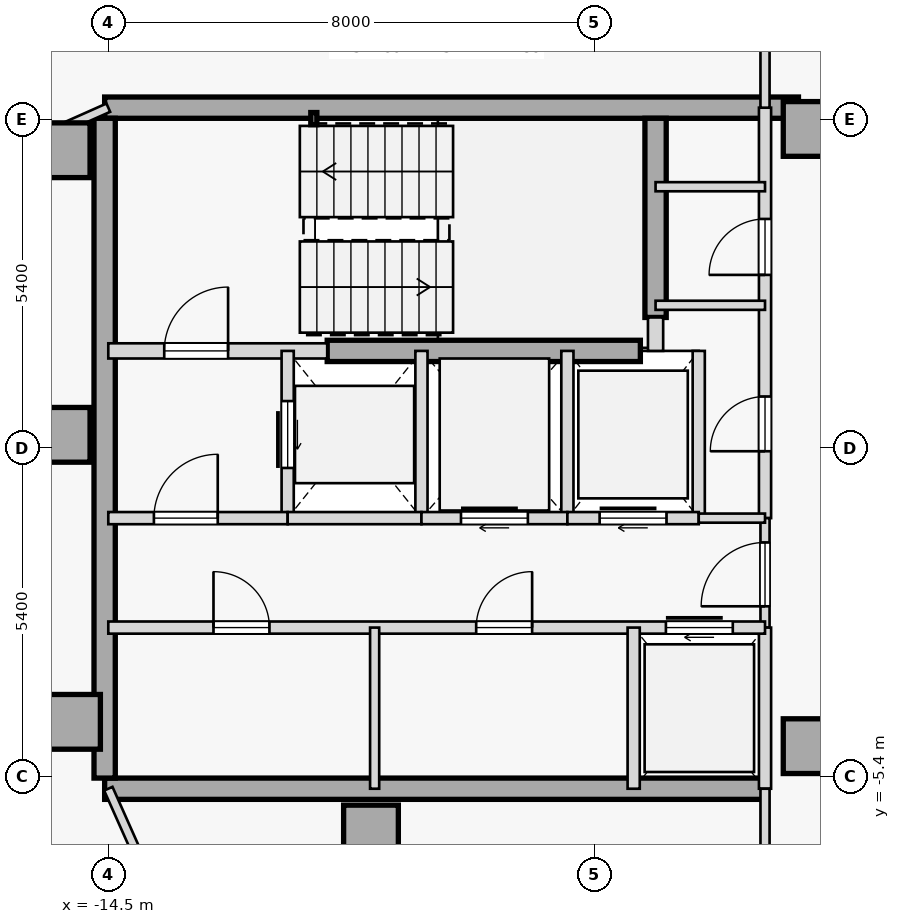
"""IFC4 building model, lengths in metres.
Left out: names, types, materials, properties, quantities, classifications, styles, units other than length and angle.
Written with IfcOpenShell. Run it as: python <this file> out.ifc"""

import sys

from ifc_helpers import new_model, si_unit, direction, frame, frame_2d, origin, origin_2d, place, context, subcontext, project, spatial, rectangle, hollow_rectangle, extrude, element, fill, save


model = new_model("IFC4")
c1 = context("Model", 3, precision=1e-05, world=origin(), true_north=direction((0.0, 1.0)))
c2 = subcontext(c1, "Body", "Model", "MODEL_VIEW")
j1 = project(units=[si_unit("LENGTHUNIT", "METRE"), si_unit("PLANEANGLEUNIT", "RADIAN")], contexts=[c1])
p1 = place(None, origin())
s1 = spatial("IfcSite", under=j1, at=p1, CompositionType="ELEMENT")
p2 = place(p1, origin())
s2 = spatial("IfcBuilding", under=s1, at=p2, CompositionType="ELEMENT")
p3 = place(p2, frame((0.0, 0.0, 285.25)))
s3 = spatial("IfcBuildingStorey", under=s2, at=p3, CompositionType="ELEMENT", Elevation=285.25)
for number, where, z_axis, x_axis in (
    (1, (-15.25, 4.9, 0.0), (0.0, 0.0, 1.0), (1.0, 0.0, 0.0)),
    (2, (-15.25, 0.22, 0.0), (0.0, 0.0, 1.0), (1.0, 0.0, 0.0)),
    (3, (-15.08, -4.5, 0.0), (0.0, 0.0, 1.0), (1.0, 0.0, 0.0)),
    (4, (-10.18, -6.32, 0.0), (0.0, 0.0, 1.0), (1.0, 0.0, 0.0)),
    (5, (-2.95, -4.9, 0.0), (0.0, 0.0, 1.0), (1.0, 0.0, 0.0)),
    (6, (-2.95, 5.25, 0.0), (0.0, 0.0, 1.0), (1.0, 0.0, 0.0)),
):
    element("IfcColumn", number, at=place(p3, frame(where, z_axis=z_axis, x_axis=x_axis)), inside=s3, PredefinedType="COLUMN", context=c2, shape_type="SweptSolid", body=[
        extrude(rectangle(XDim=0.9, YDim=0.9, at=origin_2d()), origin(), (0.0, 0.0, 1.0), 3.35),
    ])
p4 = place(p3, frame((-14.56, 5.6, 0.0), z_axis=(0.0, 0.0, 1.0), x_axis=(1.0, 0.0, 0.0)))
e7 = element("IfcWall", 7, at=p4, inside=s3, PredefinedType="SHEAR", context=c2, shape_type="SweptSolid", body=[
    extrude(rectangle(XDim=11.41, YDim=0.35, at=frame_2d((5.705, 0.0))), origin(), (0.0, 0.0, 1.0), 3.125),
])
p5 = place(p3, frame((-14.56, -5.6, 0.0), z_axis=(0.0, 0.0, 1.0), x_axis=(1.0, 0.0, 0.0)))
e8 = element("IfcWall", 8, at=p5, inside=s3, PredefinedType="SHEAR", context=c2, shape_type="SweptSolid", body=[
    extrude(rectangle(XDim=10.86, YDim=0.35, at=frame_2d((5.43, 0.0))), origin(), (0.0, 0.0, 1.0), 3.125),
])
p6 = place(p3, frame((-14.56, -5.425, 0.0), z_axis=(0.0, 0.0, 1.0), x_axis=(0.0, 1.0, 0.0)))
e9 = element("IfcWall", 9, at=p6, inside=s3, PredefinedType="SHEAR", context=c2, shape_type="SweptSolid", body=[
    extrude(rectangle(XDim=10.85, YDim=0.35, at=frame_2d((5.425, 0.0))), origin(), (0.0, 0.0, 1.0), 3.125),
])
p7 = place(p3, frame((-5.5, 2.15, 0.0), z_axis=(0.0, 0.0, 1.0), x_axis=(0.0, 1.0, 0.0)))
e10 = element("IfcWall", 10, at=p7, inside=s3, PredefinedType="SHEAR", context=c2, shape_type="SweptSolid", body=[
    extrude(rectangle(XDim=3.275, YDim=0.35, at=frame_2d((1.638, 0.0))), origin(), (0.0, 0.0, 1.0), 3.125),
])
p8 = place(p3, frame((-10.9, 1.6, 0.0), z_axis=(0.0, 0.0, 1.0), x_axis=(1.0, 0.0, 0.0)))
e11 = element("IfcWall", 11, at=p8, inside=s3, PredefinedType="SHEAR", context=c2, shape_type="SweptSolid", body=[
    extrude(rectangle(XDim=5.15, YDim=0.35, at=frame_2d((2.575, 0.0))), origin(), (0.0, 0.0, 1.0), 3.125),
])
p9 = place(p3, frame((-11.12, 5.42, 0.0), z_axis=(0.0, 0.0, 1.0), x_axis=(1.0, 0.0, 0.0)))
e12 = element("IfcColumn", 12, at=p9, inside=s3, PredefinedType="COLUMN", context=c2, shape_type="SweptSolid", body=[
    extrude(hollow_rectangle(XDim=0.1, YDim=0.2, WallThickness=0.008, at=origin_2d()), origin(), (0.0, 0.0, 1.0), 3.35),
])
p10 = place(p3, frame((-14.5, 1.6, 0.0), z_axis=(0.0, 0.0, 1.0), x_axis=(1.0, 0.0, 0.0)))
e13 = element("IfcWall", 13, at=p10, inside=s3, PredefinedType="STANDARD", context=c2, shape_type="SweptSolid", body=[
    extrude(rectangle(XDim=3.6, YDim=0.25, at=frame_2d((1.8, 0.0))), origin(), (0.0, 0.0, 1.0), 3.125),
])
p11 = place(p10, frame((0.92, 0.0, 0.0)))
e14 = element("IfcOpeningElement", 14, at=p11, cuts=e13, PredefinedType="OPENING", context=c2, shape_type="SweptSolid", body=[
    extrude(rectangle(XDim=1.05, YDim=2.15, at=frame_2d((0.525, 1.075))), frame((0.0, 0.135, 0.0), z_axis=(0.0, -1.0, 0.0), x_axis=(1.0, 0.0, 0.0)), (0.0, 0.0, 1.0), 0.27),
])
p12 = place(p3, frame((-5.5, 1.6, 0.0), z_axis=(0.0, 0.0, 1.0), x_axis=(0.0, 1.0, 0.0)))
e15 = element("IfcWall", 15, at=p12, inside=s3, PredefinedType="STANDARD", context=c2, shape_type="SweptSolid", body=[
    extrude(rectangle(XDim=0.55, YDim=0.25, at=frame_2d((0.275, 0.0))), origin(), (0.0, 0.0, 1.0), 3.125),
])
p13 = place(p3, frame((-3.7, -1.15, 0.0), z_axis=(0.0, 0.0, 1.0), x_axis=(0.0, 1.0, 0.0)))
e16 = element("IfcWall", 16, at=p13, inside=s3, PredefinedType="STANDARD", context=c2, shape_type="SweptSolid", body=[
    extrude(rectangle(XDim=6.75, YDim=0.2, at=frame_2d((3.375, 0.0))), origin(), (0.0, 0.0, 1.0), 3.125),
])
p14 = place(p13, frame((1.1, 0.0, 0.0)))
e17 = element("IfcOpeningElement", 17, at=p14, cuts=e16, PredefinedType="OPENING", context=c2, shape_type="SweptSolid", body=[
    extrude(rectangle(XDim=0.9, YDim=2.15, at=frame_2d((0.45, 1.075))), frame((0.0, 0.11, 0.0), z_axis=(0.0, -1.0, 0.0), x_axis=(1.0, 0.0, 0.0)), (0.0, 0.0, 1.0), 0.22),
])
p15 = place(p13, frame((4.0, 0.0, 0.0)))
e18 = element("IfcOpeningElement", 18, at=p15, cuts=e16, PredefinedType="OPENING", context=c2, shape_type="SweptSolid", body=[
    extrude(rectangle(XDim=0.92, YDim=2.15, at=frame_2d((0.46, 1.075))), frame((0.0, 0.11, 0.0), z_axis=(0.0, -1.0, 0.0), x_axis=(1.0, 0.0, 0.0)), (0.0, 0.0, 1.0), 0.22),
])
p16 = place(p3, frame((-3.7, -2.95, 0.0), z_axis=(0.0, 0.0, 1.0), x_axis=(0.0, 1.0, 0.0)))
e19 = element("IfcWall", 19, at=p16, inside=s3, PredefinedType="PARTITIONING", context=c2, shape_type="SweptSolid", body=[
    extrude(rectangle(XDim=1.8, YDim=0.15, at=frame_2d((0.9, 0.0))), origin(), (0.0, 0.0, 1.0), 3.125),
])
p17 = place(p16, frame((0.35, 0.0, 0.0)))
e20 = element("IfcOpeningElement", 20, at=p17, cuts=e19, PredefinedType="OPENING", context=c2, shape_type="SweptSolid", body=[
    extrude(rectangle(XDim=1.05, YDim=2.18, at=frame_2d((0.525, 1.09))), frame((0.0, 0.085, 0.0), z_axis=(0.0, -1.0, 0.0), x_axis=(1.0, 0.0, 0.0)), (0.0, 0.0, 1.0), 0.17),
])
p18 = place(p3, frame((-3.7, -5.6, 0.0), z_axis=(0.0, 0.0, 1.0), x_axis=(0.0, 1.0, 0.0)))
e21 = element("IfcWall", 21, at=p18, inside=s3, PredefinedType="STANDARD", context=c2, shape_type="SweptSolid", body=[
    extrude(rectangle(XDim=2.65, YDim=0.2, at=frame_2d((1.325, 0.0))), origin(), (0.0, 0.0, 1.0), 3.125),
])
p19 = place(p3, frame((-11.55, -1.15, 0.0), z_axis=(0.0, 0.0, 1.0), x_axis=(0.0, 1.0, 0.0)))
e22 = element("IfcWall", 22, at=p19, inside=s3, PredefinedType="STANDARD", context=c2, shape_type="SweptSolid", body=[
    extrude(rectangle(XDim=2.75, YDim=0.2, at=frame_2d((1.375, 0.0))), origin(), (0.0, 0.0, 1.0), 3.125),
])
p20 = place(p19, frame((0.825, 0.0, 0.0)))
e23 = element("IfcOpeningElement", 23, at=p20, cuts=e22, PredefinedType="OPENING", context=c2, shape_type="SweptSolid", body=[
    extrude(rectangle(XDim=1.1, YDim=2.15, at=frame_2d((0.55, 1.075))), frame((0.0, 0.11, 0.0), z_axis=(0.0, -1.0, 0.0), x_axis=(1.0, 0.0, 0.0)), (0.0, 0.0, 1.0), 0.22),
])
p21 = place(p3, frame((-9.35, -1.15, 0.0), z_axis=(0.0, 0.0, 1.0), x_axis=(0.0, 1.0, 0.0)))
e24 = element("IfcWall", 24, at=p21, inside=s3, PredefinedType="STANDARD", context=c2, shape_type="SweptSolid", body=[
    extrude(rectangle(XDim=2.75, YDim=0.2, at=frame_2d((1.375, 0.0))), origin(), (0.0, 0.0, 1.0), 3.125),
])
p22 = place(p3, frame((-14.5, -1.15, 0.0), z_axis=(0.0, 0.0, 1.0), x_axis=(1.0, 0.0, 0.0)))
e25 = element("IfcWall", 25, at=p22, inside=s3, PredefinedType="STANDARD", context=c2, shape_type="SweptSolid", body=[
    extrude(rectangle(XDim=2.95, YDim=0.2, at=frame_2d((1.475, 0.0))), origin(), (0.0, 0.0, 1.0), 3.125),
])
p23 = place(p22, frame((0.75, 0.0, 0.0)))
e26 = element("IfcOpeningElement", 26, at=p23, cuts=e25, PredefinedType="OPENING", context=c2, shape_type="SweptSolid", body=[
    extrude(rectangle(XDim=1.05, YDim=2.18, at=frame_2d((0.525, 1.09))), frame((0.0, 0.11, 0.0), z_axis=(0.0, -1.0, 0.0), x_axis=(1.0, 0.0, 0.0)), (0.0, 0.0, 1.0), 0.22),
])
p24 = place(p3, frame((-11.55, -1.15, 0.0), z_axis=(0.0, 0.0, 1.0), x_axis=(1.0, 0.0, 0.0)))
e27 = element("IfcWall", 27, at=p24, inside=s3, PredefinedType="STANDARD", context=c2, shape_type="SweptSolid", body=[
    extrude(rectangle(XDim=2.2, YDim=0.2, at=frame_2d((1.1, 0.0))), origin(), (0.0, 0.0, 1.0), 3.125),
])
p25 = place(p3, frame((-6.95, -1.15, 0.0), z_axis=(0.0, 0.0, 1.0), x_axis=(0.0, 1.0, 0.0)))
e28 = element("IfcWall", 28, at=p25, inside=s3, PredefinedType="STANDARD", context=c2, shape_type="SweptSolid", body=[
    extrude(rectangle(XDim=2.75, YDim=0.2, at=frame_2d((1.375, 0.0))), origin(), (0.0, 0.0, 1.0), 3.125),
])
p26 = place(p3, frame((-9.35, -1.15, 0.0), z_axis=(0.0, 0.0, 1.0), x_axis=(1.0, 0.0, 0.0)))
e29 = element("IfcWall", 29, at=p26, inside=s3, PredefinedType="STANDARD", context=c2, shape_type="SweptSolid", body=[
    extrude(rectangle(XDim=2.4, YDim=0.2, at=frame_2d((1.2, 0.0))), origin(), (0.0, 0.0, 1.0), 3.125),
])
p27 = place(p26, frame((0.65, 0.0, 0.0)))
e30 = element("IfcOpeningElement", 30, at=p27, cuts=e29, PredefinedType="OPENING", context=c2, shape_type="SweptSolid", body=[
    extrude(rectangle(XDim=1.1, YDim=2.15, at=frame_2d((0.55, 1.075))), frame((0.0, 0.11, 0.0), z_axis=(0.0, -1.0, 0.0), x_axis=(1.0, 0.0, 0.0)), (0.0, 0.0, 1.0), 0.22),
])
p28 = place(p3, frame((-4.79, -1.15, 0.0), z_axis=(0.0, 0.0, 1.0), x_axis=(0.0, 1.0, 0.0)))
e31 = element("IfcWall", 31, at=p28, inside=s3, PredefinedType="STANDARD", context=c2, shape_type="SweptSolid", body=[
    extrude(rectangle(XDim=2.75, YDim=0.2, at=frame_2d((1.375, 0.0))), origin(), (0.0, 0.0, 1.0), 3.125),
])
p29 = place(p3, frame((-6.95, -1.15, 0.0), z_axis=(0.0, 0.0, 1.0), x_axis=(1.0, 0.0, 0.0)))
e32 = element("IfcWall", 32, at=p29, inside=s3, PredefinedType="STANDARD", context=c2, shape_type="SweptSolid", body=[
    extrude(rectangle(XDim=2.16, YDim=0.2, at=frame_2d((1.08, 0.0))), origin(), (0.0, 0.0, 1.0), 3.125),
])
p30 = place(p29, frame((0.53, 0.0, 0.0)))
e33 = element("IfcOpeningElement", 33, at=p30, cuts=e32, PredefinedType="OPENING", context=c2, shape_type="SweptSolid", body=[
    extrude(rectangle(XDim=1.1, YDim=2.15, at=frame_2d((0.55, 1.075))), frame((0.0, 0.11, 0.0), z_axis=(0.0, -1.0, 0.0), x_axis=(1.0, 0.0, 0.0)), (0.0, 0.0, 1.0), 0.22),
])
p31 = place(p3, frame((-4.79, -1.15, 0.0), z_axis=(0.0, 0.0, 1.0), x_axis=(1.0, 0.0, 0.0)))
e34 = element("IfcWall", 34, at=p31, inside=s3, PredefinedType="PARTITIONING", context=c2, shape_type="SweptSolid", body=[
    extrude(rectangle(XDim=1.09, YDim=0.15, at=frame_2d((0.545, 0.0))), origin(), (0.0, 0.0, 1.0), 3.125),
])
p32 = place(p3, frame((-14.5, -2.95, 0.0), z_axis=(0.0, 0.0, 1.0), x_axis=(1.0, 0.0, 0.0)))
e35 = element("IfcWall", 35, at=p32, inside=s3, PredefinedType="STANDARD", context=c2, shape_type="SweptSolid", body=[
    extrude(rectangle(XDim=10.8, YDim=0.2, at=frame_2d((5.4, 0.0))), origin(), (0.0, 0.0, 1.0), 3.125),
])
p33 = place(p32, frame((9.17, 0.0, 0.0)))
e36 = element("IfcOpeningElement", 36, at=p33, cuts=e35, PredefinedType="OPENING", context=c2, shape_type="SweptSolid", body=[
    extrude(rectangle(XDim=1.1, YDim=2.15, at=frame_2d((0.55, 1.075))), frame((0.0, 0.11, 0.0), z_axis=(0.0, -1.0, 0.0), x_axis=(1.0, 0.0, 0.0)), (0.0, 0.0, 1.0), 0.22),
])
p34 = place(p32, frame((1.73, 0.0, 0.0)))
e37 = element("IfcOpeningElement", 37, at=p34, cuts=e35, PredefinedType="OPENING", context=c2, shape_type="SweptSolid", body=[
    extrude(rectangle(XDim=0.92, YDim=2.15, at=frame_2d((0.46, 1.075))), frame((0.0, 0.11, 0.0), z_axis=(0.0, -1.0, 0.0), x_axis=(1.0, 0.0, 0.0)), (0.0, 0.0, 1.0), 0.22),
])
p35 = place(p32, frame((6.05, 0.0, 0.0)))
e38 = element("IfcOpeningElement", 38, at=p35, cuts=e35, PredefinedType="OPENING", context=c2, shape_type="SweptSolid", body=[
    extrude(rectangle(XDim=0.92, YDim=2.15, at=frame_2d((0.46, 1.075))), frame((0.0, 0.11, 0.0), z_axis=(0.0, -1.0, 0.0), x_axis=(1.0, 0.0, 0.0)), (0.0, 0.0, 1.0), 0.22),
])
p36 = place(p3, frame((-5.86, -5.6, 0.0), z_axis=(0.0, 0.0, 1.0), x_axis=(0.0, 1.0, 0.0)))
e39 = element("IfcWall", 39, at=p36, inside=s3, PredefinedType="STANDARD", context=c2, shape_type="SweptSolid", body=[
    extrude(rectangle(XDim=2.65, YDim=0.2, at=frame_2d((1.325, 0.0))), origin(), (0.0, 0.0, 1.0), 3.125),
])
p37 = place(p3, frame((-10.12, -5.6, 0.0), z_axis=(0.0, 0.0, 1.0), x_axis=(0.0, 1.0, 0.0)))
e40 = element("IfcWall", 40, at=p37, inside=s3, PredefinedType="PARTITIONING", context=c2, shape_type="SweptSolid", body=[
    extrude(rectangle(XDim=2.65, YDim=0.15, at=frame_2d((1.325, 0.0))), origin(), (0.0, 0.0, 1.0), 3.125),
])
for number, where, z_axis, x_axis in (
    (41, (-5.5, 4.3, 0.0), (0.0, 0.0, 1.0), (1.0, 0.0, 0.0)),
    (42, (-5.5, 2.35, 0.0), (0.0, 0.0, 1.0), (1.0, 0.0, 0.0)),
):
    element("IfcWall", number, at=place(p3, frame(where, z_axis=z_axis, x_axis=x_axis)), inside=s3, PredefinedType="PARTITIONING", context=c2, shape_type="SweptSolid", body=[
        extrude(rectangle(XDim=1.8, YDim=0.15, at=frame_2d((0.9, 0.0))), origin(), (0.0, 0.0, 1.0), 3.125),
    ])
p38 = place(p3, frame((-3.7, -9.054, 0.0), z_axis=(0.0, 0.0, 1.0), x_axis=(-7.0671378e-05, 0.999999997503, 0.0)))
e43 = element("IfcWall", 43, at=p38, inside=s3, PredefinedType="PARTITIONING", context=c2, shape_type="SweptSolid", body=[
    extrude(rectangle(XDim=3.455, YDim=0.15, at=frame_2d((1.727, 0.0))), origin(), (0.0, 0.0, 1.0), 3.125),
])
p39 = place(p38, frame((1.267, 0.0, 0.0)))
e44 = element("IfcOpeningElement", 44, at=p39, cuts=e43, PredefinedType="OPENING", context=c2, shape_type="SweptSolid", body=[
    extrude(rectangle(XDim=0.92, YDim=2.15, at=frame_2d((0.46, 1.075))), frame((0.0, 0.085, 0.0), z_axis=(0.0, -1.0, 0.0), x_axis=(1.0, 0.0, 0.0)), (0.0, 0.0, 1.0), 0.17),
])
p40 = place(p3, frame((-18.661, 3.747, 0.0), z_axis=(0.0, 0.0, 1.0), x_axis=(0.913535055583, 0.40676000568, 0.0)))
e45 = element("IfcWall", 45, at=p40, inside=s3, PredefinedType="PARTITIONING", context=c2, shape_type="SweptSolid", body=[
    extrude(rectangle(XDim=4.555, YDim=0.15, at=frame_2d((2.277, 0.0))), origin(), (0.0, 0.0, 1.0), 3.125),
])
p41 = place(p40, frame((1.134, 0.0, 0.0)))
e46 = element("IfcOpeningElement", 46, at=p41, cuts=e45, PredefinedType="OPENING", context=c2, shape_type="SweptSolid", body=[
    extrude(rectangle(XDim=0.92, YDim=2.15, at=frame_2d((0.46, 1.075))), frame((0.0, 0.085, 0.0), z_axis=(0.0, -1.0, 0.0), x_axis=(1.0, 0.0, 0.0)), (0.0, 0.0, 1.0), 0.17),
])
p42 = place(p3, frame((-3.7, 5.6, 0.0), z_axis=(0.0, 0.0, 1.0), x_axis=(5.077173e-05, 0.999999998711, 0.0)))
e47 = element("IfcWall", 47, at=p42, inside=s3, PredefinedType="PARTITIONING", context=c2, shape_type="SweptSolid", body=[
    extrude(rectangle(XDim=4.809, YDim=0.15, at=frame_2d((2.404, 0.0))), origin(), (0.0, 0.0, 1.0), 3.125),
])
p43 = place(p3, frame((-19.32, 5.227, 0.0), z_axis=(0.0, 0.0, 1.0), x_axis=(0.913543828741, 0.406740301628, 0.0)))
e48 = element("IfcWall", 48, at=p43, inside=s3, PredefinedType="PARTITIONING", context=c2, shape_type="SweptSolid", body=[
    extrude(rectangle(XDim=11.177, YDim=0.15, at=frame_2d((5.588, 0.0))), origin(), (0.0, 0.0, 1.0), 3.125),
])
p44 = place(p43, frame((5.128, 0.0, 0.0)))
e49 = element("IfcOpeningElement", 49, at=p44, cuts=e48, PredefinedType="OPENING", context=c2, shape_type="SweptSolid", body=[
    extrude(rectangle(XDim=0.92, YDim=2.15, at=frame_2d((0.46, 1.075))), frame((0.0, 0.085, 0.0), z_axis=(0.0, -1.0, 0.0), x_axis=(1.0, 0.0, 0.0)), (0.0, 0.0, 1.0), 0.17),
])
p45 = place(p3, frame((-13.017, -8.93, 0.0), z_axis=(0.0, 0.0, 1.0), x_axis=(-0.406722395322, 0.913551801018, 0.0)))
e50 = element("IfcWall", 50, at=p45, inside=s3, PredefinedType="PARTITIONING", context=c2, shape_type="SweptSolid", body=[
    extrude(rectangle(XDim=3.646, YDim=0.15, at=frame_2d((1.823, 0.0))), origin(), (0.0, 0.0, 1.0), 3.125),
])
p46 = place(p11, origin())
e51 = element("IfcDoor", 51, at=p46, inside=s3, OperationType="SINGLE_SWING_RIGHT", PredefinedType="DOOR", context=c2, shape_type="SweptSolid", body=[
    extrude(rectangle(XDim=1.05, YDim=2.15, at=frame_2d((0.525, 1.075))), frame((0.0, 0.025, 0.0), z_axis=(0.0, -1.0, 0.0), x_axis=(1.0, 0.0, 0.0)), (0.0, 0.0, 1.0), 0.05),
])
fill(e14, e51)
p47 = place(p23, origin())
e52 = element("IfcDoor", 52, at=p47, inside=s3, OperationType="SINGLE_SWING_RIGHT", PredefinedType="DOOR", context=c2, shape_type="SweptSolid", body=[
    extrude(rectangle(XDim=1.05, YDim=2.18, at=frame_2d((0.525, 1.09))), frame((0.0, 0.025, 0.0), z_axis=(0.0, -1.0, 0.0), x_axis=(1.0, 0.0, 0.0)), (0.0, 0.0, 1.0), 0.05),
])
fill(e26, e52)
p48 = place(p17, origin())
e53 = element("IfcDoor", 53, at=p48, inside=s3, OperationType="SINGLE_SWING_LEFT", PredefinedType="DOOR", context=c2, shape_type="SweptSolid", body=[
    extrude(rectangle(XDim=1.05, YDim=2.18, at=frame_2d((0.525, 1.09))), frame((0.0, 0.025, 0.0), z_axis=(0.0, -1.0, 0.0), x_axis=(1.0, 0.0, 0.0)), (0.0, 0.0, 1.0), 0.05),
])
fill(e20, e53)
p49 = place(p20, origin())
e54 = element("IfcDoor", 54, at=p49, inside=s3, OperationType="SLIDING_TO_RIGHT", PredefinedType="DOOR", context=c2, shape_type="SweptSolid", body=[
    extrude(rectangle(XDim=1.1, YDim=2.15, at=frame_2d((0.55, 1.075))), frame((0.0, 0.025, 0.0), z_axis=(0.0, -1.0, 0.0), x_axis=(1.0, 0.0, 0.0)), (0.0, 0.0, 1.0), 0.05),
])
fill(e23, e54)
p50 = place(p27, origin())
e55 = element("IfcDoor", 55, at=p50, inside=s3, OperationType="SLIDING_TO_RIGHT", PredefinedType="DOOR", context=c2, shape_type="SweptSolid", body=[
    extrude(rectangle(XDim=1.1, YDim=2.15, at=frame_2d((0.55, 1.075))), frame((0.0, 0.025, 0.0), z_axis=(0.0, -1.0, 0.0), x_axis=(1.0, 0.0, 0.0)), (0.0, 0.0, 1.0), 0.05),
])
fill(e30, e55)
p51 = place(p30, origin())
e56 = element("IfcDoor", 56, at=p51, inside=s3, OperationType="SLIDING_TO_RIGHT", PredefinedType="DOOR", context=c2, shape_type="SweptSolid", body=[
    extrude(rectangle(XDim=1.1, YDim=2.15, at=frame_2d((0.55, 1.075))), frame((0.0, 0.025, 0.0), z_axis=(0.0, -1.0, 0.0), x_axis=(1.0, 0.0, 0.0)), (0.0, 0.0, 1.0), 0.05),
])
fill(e33, e56)
p52 = place(p33, origin())
e57 = element("IfcDoor", 57, at=p52, inside=s3, OperationType="SLIDING_TO_RIGHT", PredefinedType="DOOR", context=c2, shape_type="SweptSolid", body=[
    extrude(rectangle(XDim=1.1, YDim=2.15, at=frame_2d((0.55, 1.075))), frame((0.0, 0.025, 0.0), z_axis=(0.0, -1.0, 0.0), x_axis=(1.0, 0.0, 0.0)), (0.0, 0.0, 1.0), 0.05),
])
fill(e36, e57)
p53 = place(p34, origin())
e58 = element("IfcDoor", 58, at=p53, inside=s3, OperationType="SINGLE_SWING_LEFT", PredefinedType="DOOR", context=c2, shape_type="SweptSolid", body=[
    extrude(rectangle(XDim=0.92, YDim=2.15, at=frame_2d((0.46, 1.075))), frame((0.0, 0.025, 0.0), z_axis=(0.0, -1.0, 0.0), x_axis=(1.0, 0.0, 0.0)), (0.0, 0.0, 1.0), 0.05),
])
fill(e37, e58)
p54 = place(p35, origin())
e59 = element("IfcDoor", 59, at=p54, inside=s3, OperationType="SINGLE_SWING_RIGHT", PredefinedType="DOOR", context=c2, shape_type="SweptSolid", body=[
    extrude(rectangle(XDim=0.92, YDim=2.15, at=frame_2d((0.46, 1.075))), frame((0.0, 0.025, 0.0), z_axis=(0.0, -1.0, 0.0), x_axis=(1.0, 0.0, 0.0)), (0.0, 0.0, 1.0), 0.05),
])
fill(e38, e59)
p55 = place(p14, origin())
e60 = element("IfcDoor", 60, at=p55, inside=s3, OperationType="SINGLE_SWING_LEFT", PredefinedType="DOOR", context=c2, shape_type="SweptSolid", body=[
    extrude(rectangle(XDim=0.9, YDim=2.15, at=frame_2d((0.45, 1.075))), frame((0.0, 0.025, 0.0), z_axis=(0.0, -1.0, 0.0), x_axis=(1.0, 0.0, 0.0)), (0.0, 0.0, 1.0), 0.05),
])
fill(e17, e60)
p56 = place(p15, origin())
e61 = element("IfcDoor", 61, at=p56, inside=s3, OperationType="SINGLE_SWING_LEFT", PredefinedType="DOOR", context=c2, shape_type="SweptSolid", body=[
    extrude(rectangle(XDim=0.92, YDim=2.15, at=frame_2d((0.46, 1.075))), frame((0.0, 0.025, 0.0), z_axis=(0.0, -1.0, 0.0), x_axis=(1.0, 0.0, 0.0)), (0.0, 0.0, 1.0), 0.05),
])
fill(e18, e61)
save(model, sys.argv[1])
